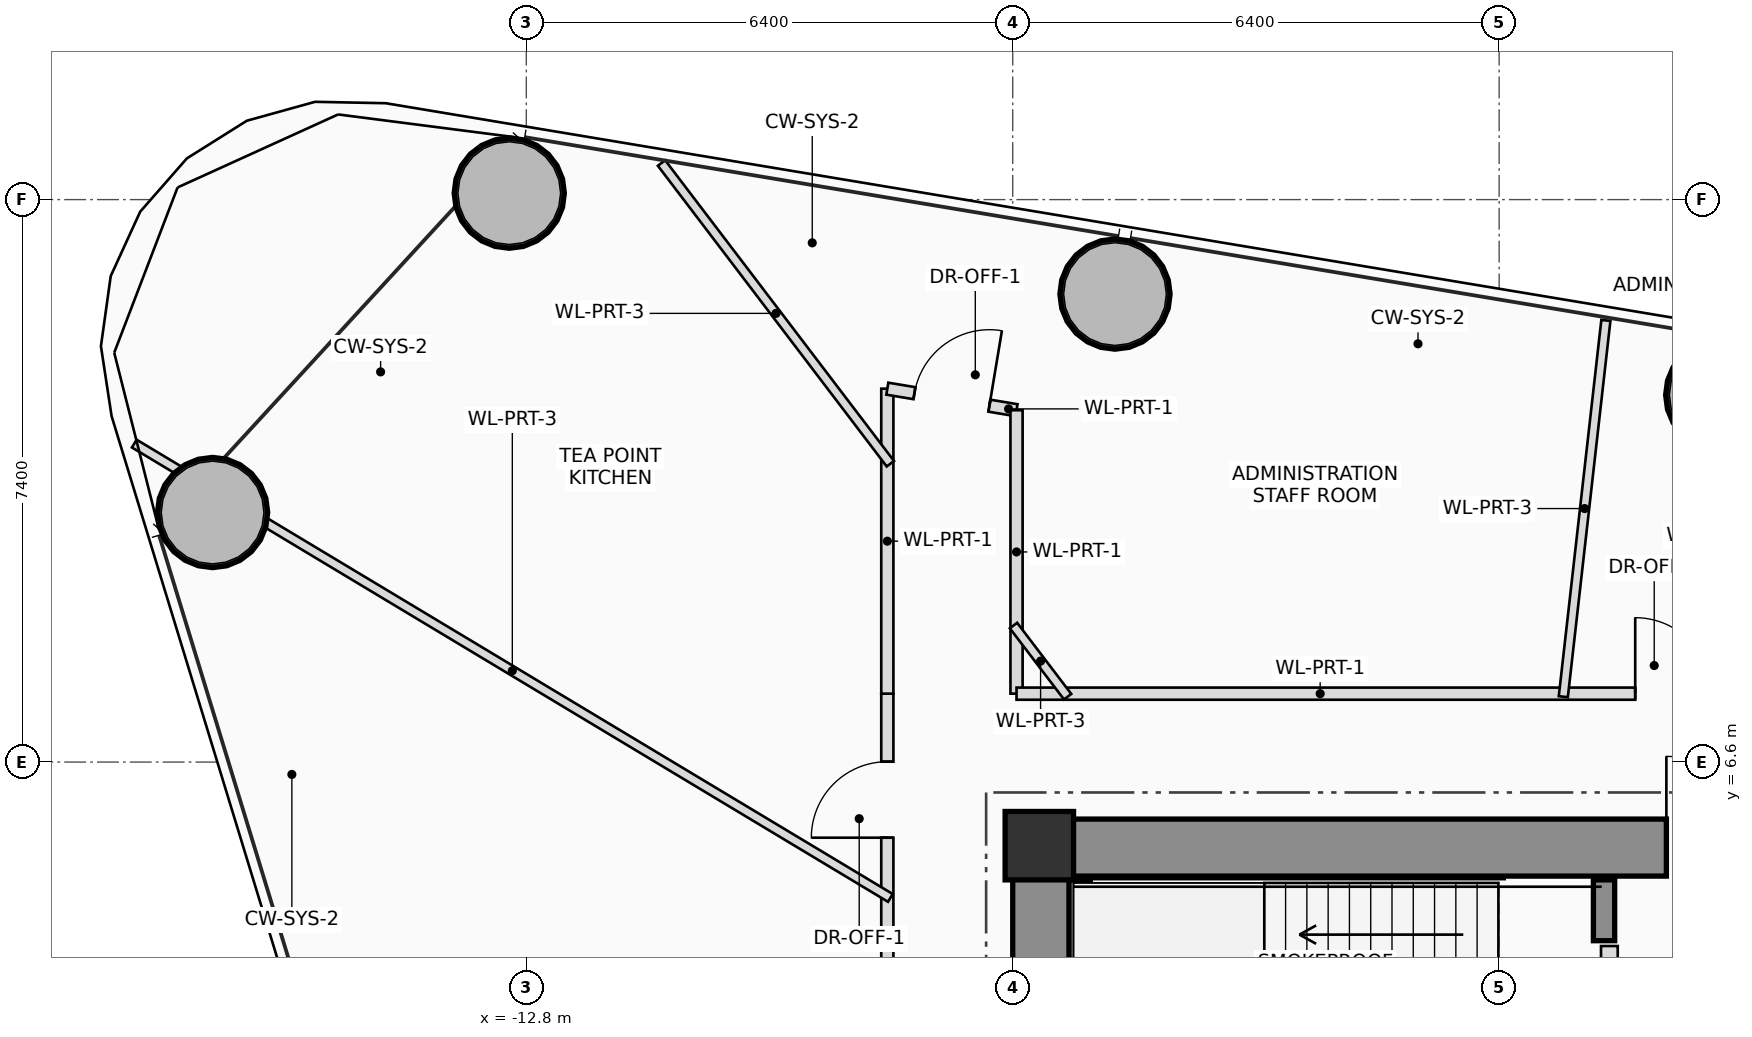
"""IFC4 building model, lengths in metres.
Left out: names, types, materials, properties, quantities, classifications, styles, units other than length and angle.
Written with IfcOpenShell. Run it as: python <this file> out.ifc"""

import sys

from ifc_helpers import new_model, si_unit, direction, frame, frame_2d, origin, origin_2d, place, context, subcontext, project, spatial, rectangle, hollow_circle, extrude, source, transform, mapped, element, fill, save


model = new_model("IFC4")
c1 = context("Model", 3, precision=1e-05, world=origin(), true_north=direction((0.0, 1.0)))
c2 = subcontext(c1, "Body", "Model", "MODEL_VIEW")
j1 = project(units=[si_unit("LENGTHUNIT", "METRE"), si_unit("PLANEANGLEUNIT", "RADIAN")], contexts=[c1])
p1 = place(None, origin())
s1 = spatial("IfcSite", under=j1, at=p1, CompositionType="ELEMENT")
p2 = place(p1, origin())
s2 = spatial("IfcBuilding", under=s1, at=p2, CompositionType="ELEMENT")
p3 = place(p2, frame((0.0, 0.0, 97.4)))
s3 = spatial("IfcBuildingStorey", under=s2, at=p3, CompositionType="ELEMENT", Elevation=97.4)
m1 = source(origin(), c2, "Body", "SweptSolid", [
    extrude(rectangle(XDim=0.9, YDim=0.9, at=origin_2d()), origin(), (0.0, 0.0, 1.0), 3.75),
])
p4 = place(p3, frame((-6.05, 5.5, 0.0), z_axis=(0.0, 0.0, 1.0), x_axis=(1.0, 0.0, 0.0)))
e1 = element("IfcColumn", 1, at=p4, inside=s3, PredefinedType="COLUMN", context=c2, shape_type="MappedRepresentation", body=[
    mapped(m1, transform((0.0, 0.0, 0.0), scale=1.0)),
])
p5 = place(p3, frame((-6.4, 5.475, 0.0), z_axis=(0.0, 0.0, 1.0), x_axis=(1.0, 0.0, 0.0)))
e2 = element("IfcWall", 2, at=p5, inside=s3, PredefinedType="SHEAR", context=c2, shape_type="SweptSolid", body=[
    extrude(rectangle(XDim=12.8, YDim=0.75, at=frame_2d((6.4, 0.0))), origin(), (0.0, 0.0, 1.0), 3.75),
])
p6 = place(p5, frame((8.6, 0.0, 0.0)))
e3 = element("IfcOpeningElement", 3, at=p6, cuts=e2, PredefinedType="OPENING", context=c2, shape_type="SweptSolid", body=[
    extrude(rectangle(XDim=1.2, YDim=2.2, at=frame_2d((0.6, 1.1))), frame((0.0, 0.385, 0.0), z_axis=(0.0, -1.0, 0.0), x_axis=(1.0, 0.0, 0.0)), (0.0, 0.0, 1.0), 0.77),
])
p7 = place(p3, frame((-6.025, 1.75, 0.0), z_axis=(0.0, 0.0, 1.0), x_axis=(0.0, 1.0, 0.0)))
e4 = element("IfcWall", 4, at=p7, inside=s3, PredefinedType="SHEAR", context=c2, shape_type="SweptSolid", body=[
    extrude(rectangle(XDim=3.35, YDim=0.75, at=frame_2d((1.675, 0.0))), origin(), (0.0, 0.0, 1.0), 3.75),
])
p8 = place(p3, frame((-5.52, 2.3, 0.0), z_axis=(0.0, 0.0, 1.0), x_axis=(0.0, 1.0, 0.0)))
e5 = element("IfcWall", 5, at=p8, inside=s3, PredefinedType="SHEAR", context=c2, shape_type="SweptSolid", body=[
    extrude(rectangle(XDim=2.75, YDim=0.28, at=frame_2d((1.375, 0.0))), origin(), (0.0, 0.0, 1.0), 3.75),
])
p9 = place(p3, frame((1.38, 4.25, 0.0), z_axis=(0.0, 0.0, 1.0), x_axis=(0.0, 1.0, 0.0)))
e6 = element("IfcWall", 6, at=p9, inside=s3, PredefinedType="SHEAR", context=c2, shape_type="SweptSolid", body=[
    extrude(rectangle(XDim=0.8, YDim=0.28, at=frame_2d((0.4, 0.0))), origin(), (0.0, 0.0, 1.0), 3.75),
])
m2 = source(origin(), c2, "Body", "SweptSolid", [
    extrude(hollow_circle(Radius=0.725, WallThickness=0.05, at=origin_2d()), origin(), (0.0, 0.0, 1.0), 3.75),
])
for number, where, z_axis, x_axis in (
    (7, (2.915, 11.429, 0.0), (0.0, 0.0, 1.0), (1.0, 0.0, 0.0)),
    (8, (-5.054, 12.757, 0.0), (0.0, 0.0, 1.0), (1.0, 0.0, 0.0)),
    (9, (-13.024, 14.085, 0.0), (0.0, 0.0, 1.0), (1.0, 0.0, 0.0)),
    (10, (-16.927, 9.883, 0.0), (0.0, 0.0, 1.0), (1.0, 0.0, 0.0)),
):
    element("IfcColumn", number, at=place(p3, frame(where, z_axis=z_axis, x_axis=x_axis)), inside=s3, PredefinedType="COLUMN", context=c2, shape_type="MappedRepresentation", body=[
        mapped(m2, transform((0.0, 0.0, 0.0), scale=1.0)),
    ])
p10 = place(p3, frame((1.45, 2.2, 0.0), z_axis=(0.0, 0.0, 1.0), x_axis=(0.0, 1.0, 0.0)))
e11 = element("IfcWall", 11, at=p10, inside=s3, PredefinedType="PLUMBINGWALL", context=c2, shape_type="SweptSolid", body=[
    extrude(rectangle(XDim=1.98, YDim=0.22, at=frame_2d((0.99, 0.0))), origin(), (0.0, 0.0, 1.0), 3.545),
])
p11 = place(p10, frame((0.42, 0.0, 0.0)))
e12 = element("IfcOpeningElement", 12, at=p11, cuts=e11, PredefinedType="OPENING", context=c2, shape_type="SweptSolid", body=[
    extrude(rectangle(XDim=1.15, YDim=2.15, at=frame_2d((0.575, 1.075))), frame((0.0, 0.12, 0.0), z_axis=(0.0, -1.0, 0.0), x_axis=(1.0, 0.0, 0.0)), (0.0, 0.0, 1.0), 0.24),
])
p12 = place(p3, frame((-8.05, -7.5, 0.0), z_axis=(0.0, 0.0, 1.0), x_axis=(0.0, 1.0, 0.0)))
e13 = element("IfcWall", 13, at=p12, inside=s3, PredefinedType="PARTITIONING", context=c2, shape_type="SweptSolid", body=[
    extrude(rectangle(XDim=15.0, YDim=0.16, at=frame_2d((7.5, 0.0))), origin(), (0.0, 0.0, 1.0), 2.85),
])
p13 = place(p12, frame((3.292, 0.0, 0.0)))
e14 = element("IfcOpeningElement", 14, at=p13, cuts=e13, PredefinedType="OPENING", context=c2, shape_type="SweptSolid", body=[
    extrude(rectangle(XDim=1.0, YDim=2.25, at=frame_2d((0.5, 1.125))), frame((0.0, 0.09, 0.0), z_axis=(0.0, -1.0, 0.0), x_axis=(1.0, 0.0, 0.0)), (0.0, 0.0, 1.0), 0.18),
])
p14 = place(p12, frame((8.524, 0.0, 0.0)))
e15 = element("IfcOpeningElement", 15, at=p14, cuts=e13, PredefinedType="OPENING", context=c2, shape_type="SweptSolid", body=[
    extrude(rectangle(XDim=1.0, YDim=2.25, at=frame_2d((0.5, 1.125))), frame((0.0, 0.09, 0.0), z_axis=(0.0, -1.0, 0.0), x_axis=(1.0, 0.0, 0.0)), (0.0, 0.0, 1.0), 0.18),
])
p15 = place(p12, frame((13.105, 0.0, 0.0)))
e16 = element("IfcOpeningElement", 16, at=p15, cuts=e13, PredefinedType="OPENING", context=c2, shape_type="SweptSolid", body=[
    extrude(rectangle(XDim=1.0, YDim=2.25, at=frame_2d((0.5, 1.125))), frame((0.0, 0.09, 0.0), z_axis=(0.0, -1.0, 0.0), x_axis=(1.0, 0.0, 0.0)), (0.0, 0.0, 1.0), 0.18),
])
p16 = place(p3, frame((-8.05, 7.5, 0.0), z_axis=(0.0, 0.0, 1.0), x_axis=(0.0, 1.0, 0.0)))
e17 = element("IfcWall", 17, at=p16, inside=s3, PredefinedType="PARTITIONING", context=c2, shape_type="SweptSolid", body=[
    extrude(rectangle(XDim=4.012, YDim=0.16, at=frame_2d((2.006, 0.0))), origin(), (0.0, 0.0, 1.0), 2.85),
])
p17 = place(p3, frame((-8.05, 11.512, 0.0), z_axis=(0.0, 0.0, 1.0), x_axis=(0.986405407683, -0.164330069354, 0.0)))
e18 = element("IfcWall", 18, at=p17, inside=s3, PredefinedType="PARTITIONING", context=c2, shape_type="SweptSolid", body=[
    extrude(rectangle(XDim=1.723, YDim=0.16, at=frame_2d((0.862, 0.0))), origin(), (0.0, 0.0, 1.0), 3.545),
])
p18 = place(p17, frame((0.362, 0.0, 0.0)))
e19 = element("IfcOpeningElement", 19, at=p18, cuts=e18, PredefinedType="OPENING", context=c2, shape_type="SweptSolid", body=[
    extrude(rectangle(XDim=1.0, YDim=2.25, at=frame_2d((0.5, 1.125))), frame((0.0, 0.09, 0.0), z_axis=(0.0, -1.0, 0.0), x_axis=(1.0, 0.0, 0.0)), (0.0, 0.0, 1.0), 0.18),
])
p19 = place(p3, frame((-6.35, 11.229, 0.0), z_axis=(0.0, 0.0, 1.0), x_axis=(0.0, -1.0, 0.0)))
e20 = element("IfcWall", 20, at=p19, inside=s3, PredefinedType="PARTITIONING", context=c2, shape_type="SweptSolid", body=[
    extrude(rectangle(XDim=3.729, YDim=0.16, at=frame_2d((1.865, 0.0))), origin(), (0.0, 0.0, 1.0), 3.05),
])
p20 = place(p3, frame((-6.35, 7.5, 0.0), z_axis=(0.0, 0.0, 1.0), x_axis=(1.0, 0.0, 0.0)))
e21 = element("IfcWall", 21, at=p20, inside=s3, PredefinedType="PARTITIONING", context=c2, shape_type="SweptSolid", body=[
    extrude(rectangle(XDim=12.7, YDim=0.16, at=frame_2d((6.35, 0.0))), origin(), (0.0, 0.0, 1.0), 2.85),
])
p21 = place(p20, frame((8.14, 0.0, 0.0)))
e22 = element("IfcOpeningElement", 22, at=p21, cuts=e21, PredefinedType="OPENING", context=c2, shape_type="SweptSolid", body=[
    extrude(rectangle(XDim=1.0, YDim=2.25, at=frame_2d((0.5, 1.125))), frame((0.0, 0.09, 0.0), z_axis=(0.0, -1.0, 0.0), x_axis=(1.0, 0.0, 0.0)), (0.0, 0.0, 1.0), 0.18),
])
p22 = place(p20, frame((10.799, 0.0, 0.0)))
e23 = element("IfcOpeningElement", 23, at=p22, cuts=e21, PredefinedType="OPENING", context=c2, shape_type="SweptSolid", body=[
    extrude(rectangle(XDim=1.0, YDim=2.25, at=frame_2d((0.5, 1.125))), frame((0.0, 0.09, 0.0), z_axis=(0.0, -1.0, 0.0), x_axis=(1.0, 0.0, 0.0)), (0.0, 0.0, 1.0), 0.18),
])
p23 = place(p3, frame((-8.01, 4.813, 0.0), z_axis=(0.0, 0.0, 1.0), x_axis=(-0.857173493242, 0.515027768653, 0.0)))
e24 = element("IfcWall", 24, at=p23, inside=s3, PredefinedType="PARTITIONING", context=c2, shape_type="SweptSolid", body=[
    extrude(rectangle(XDim=11.605, YDim=0.12, at=frame_2d((5.803, 0.0))), origin(), (0.0, 0.0, 1.0), 2.85),
])
p24 = place(p3, frame((0.844, 7.46, 0.0), z_axis=(0.0, 0.0, 1.0), x_axis=(0.112405035284, 0.99366247189, 0.0)))
e25 = element("IfcWall", 25, at=p24, inside=s3, PredefinedType="PARTITIONING", context=c2, shape_type="SweptSolid", body=[
    extrude(rectangle(XDim=4.982, YDim=0.12, at=frame_2d((2.491, 0.0))), origin(), (0.0, 0.0, 1.0), 3.01),
])
p25 = place(p3, frame((-5.677, 7.46, 0.0), z_axis=(0.0, 0.0, 1.0), x_axis=(-0.605430415, 0.795898242612, 0.0)))
e26 = element("IfcWall", 26, at=p25, inside=s3, PredefinedType="PARTITIONING", context=c2, shape_type="SweptSolid", body=[
    extrude(rectangle(XDim=1.177, YDim=0.12, at=frame_2d((0.588, 0.0))), origin(), (0.0, 0.0, 1.0), 2.85),
])
p26 = place(p3, frame((-8.01, 10.525, 0.0), z_axis=(0.0, 0.0, 1.0), x_axis=(-0.605587414203, 0.79577879072, 0.0)))
e27 = element("IfcWall", 27, at=p26, inside=s3, PredefinedType="PARTITIONING", context=c2, shape_type="SweptSolid", body=[
    extrude(rectangle(XDim=4.972, YDim=0.12, at=frame_2d((2.486, 0.0))), origin(), (0.0, 0.0, 1.0), 3.01),
])
p27 = place(p6, origin())
e28 = element("IfcDoor", 28, at=p27, inside=s3, OperationType="SINGLE_SWING_LEFT", PredefinedType="DOOR", context=c2, shape_type="SweptSolid", body=[
    extrude(rectangle(XDim=1.2, YDim=2.2, at=frame_2d((0.6, 1.1))), frame((0.0, 0.025, 0.0), z_axis=(0.0, -1.0, 0.0), x_axis=(1.0, 0.0, 0.0)), (0.0, 0.0, 1.0), 0.05),
])
fill(e3, e28)
p28 = place(p15, origin())
e29 = element("IfcDoor", 29, at=p28, inside=s3, OperationType="SINGLE_SWING_LEFT", PredefinedType="DOOR", context=c2, shape_type="SweptSolid", body=[
    extrude(rectangle(XDim=1.0, YDim=2.25, at=frame_2d((0.5, 1.125))), frame((0.0, 0.025, 0.0), z_axis=(0.0, -1.0, 0.0), x_axis=(1.0, 0.0, 0.0)), (0.0, 0.0, 1.0), 0.05),
])
fill(e16, e29)
p29 = place(p18, origin())
e30 = element("IfcDoor", 30, at=p29, inside=s3, OperationType="SINGLE_SWING_RIGHT", PredefinedType="DOOR", context=c2, shape_type="SweptSolid", body=[
    extrude(rectangle(XDim=1.0, YDim=2.25, at=frame_2d((0.5, 1.125))), frame((0.0, 0.025, 0.0), z_axis=(0.0, -1.0, 0.0), x_axis=(1.0, 0.0, 0.0)), (0.0, 0.0, 1.0), 0.05),
])
fill(e19, e30)
p30 = place(p21, origin())
e31 = element("IfcDoor", 31, at=p30, inside=s3, OperationType="SINGLE_SWING_LEFT", PredefinedType="DOOR", context=c2, shape_type="SweptSolid", body=[
    extrude(rectangle(XDim=1.0, YDim=2.25, at=frame_2d((0.5, 1.125))), frame((0.0, 0.025, 0.0), z_axis=(0.0, -1.0, 0.0), x_axis=(1.0, 0.0, 0.0)), (0.0, 0.0, 1.0), 0.05),
])
fill(e22, e31)
save(model, sys.argv[1])
